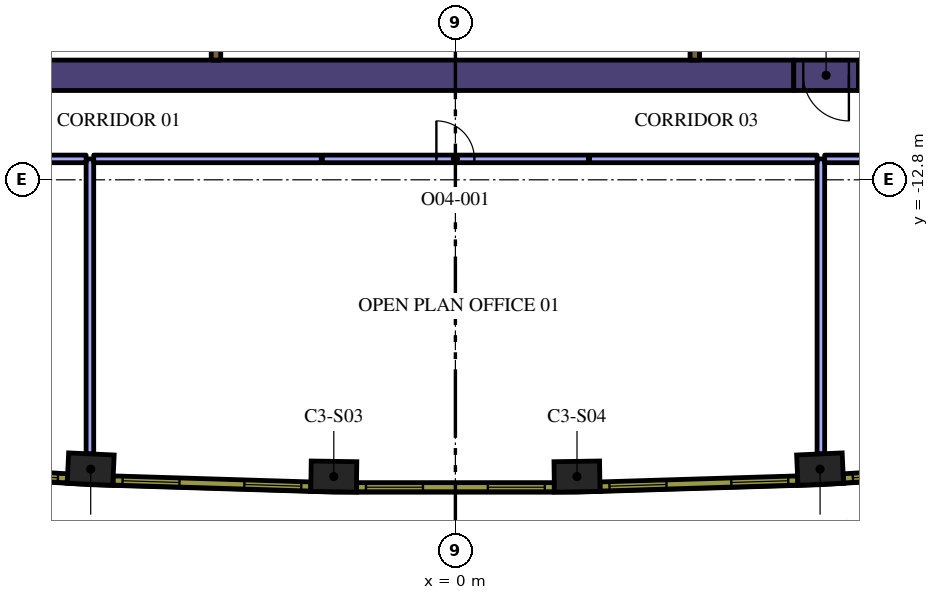
"""IFC4 building model, lengths in metres.
Left out: names, types, materials, properties, quantities, classifications, styles, units other than length and angle.
Written with IfcOpenShell. Run it as: python <this file> out.ifc"""

import sys

from ifc_helpers import new_model, si_unit, direction, frame, frame_2d, origin, origin_2d, place, context, subcontext, project, spatial, rectangle, extrude, element, fill, save


model = new_model("IFC4")
c1 = context("Model", 3, precision=1e-05, world=origin(), true_north=direction((0.0, 1.0)))
c2 = subcontext(c1, "Body", "Model", "MODEL_VIEW")
j1 = project(units=[si_unit("LENGTHUNIT", "METRE"), si_unit("PLANEANGLEUNIT", "RADIAN")], contexts=[c1])
p1 = place(None, origin())
s1 = spatial("IfcSite", under=j1, at=p1, CompositionType="ELEMENT")
p2 = place(p1, origin())
s2 = spatial("IfcBuilding", under=s1, at=p2, CompositionType="ELEMENT")
p3 = place(p2, frame((0.0, 0.0, 179.4)))
s3 = spatial("IfcBuildingStorey", under=s2, at=p3, CompositionType="ELEMENT", Elevation=179.4)
for number, where, z_axis, x_axis in (
    (1, (-9.597, -20.413, 0.0), (0.0, 0.0, 1.0), (0.999, -0.046, 0.0)),
    (2, (-3.2, -20.608, 0.0), (0.0, 0.0, 1.0), (1.0, -0.015, 0.0)),
    (3, (3.2, -20.608, 0.0), (0.0, 0.0, 1.0), (1.0, 0.015, 0.0)),
    (4, (9.597, -20.413, 0.0), (0.0, 0.0, 1.0), (0.999, 0.046, 0.0)),
):
    element("IfcColumn", number, at=place(p3, frame(where, z_axis=z_axis, x_axis=x_axis)), inside=s3, PredefinedType="COLUMN", context=c2, shape_type="SweptSolid", body=[
        extrude(rectangle(XDim=1.2, YDim=0.8, at=origin_2d()), origin(), (0.0, 0.0, 1.0), 4.2),
    ])
p4 = place(p3, frame((10.604, -10.05, 0.0), z_axis=(0.0, 0.0, 1.0), x_axis=(1.0, 0.0, 0.0)))
e5 = element("IfcWall", 5, at=p4, inside=s3, PredefinedType="SOLIDWALL", context=c2, shape_type="SweptSolid", body=[
    extrude(rectangle(XDim=1.849, YDim=0.8, at=frame_2d((0.925, 0.0))), origin(), (0.0, 0.0, 1.0), 4.2),
])
p5 = place(p3, frame((-13.378, -10.05, 0.0), z_axis=(0.0, 0.0, 1.0), x_axis=(1.0, 0.0, 0.0)))
e6 = element("IfcWall", 6, at=p5, inside=s3, PredefinedType="SOLIDWALL", context=c2, shape_type="SweptSolid", body=[
    extrude(rectangle(XDim=22.282, YDim=0.8, at=frame_2d((11.141, 0.0))), origin(), (0.0, 0.0, 1.0), 4.2),
])
p6 = place(p3, frame((-6.3, -8.925, 0.0), z_axis=(0.0, 0.0, 1.0), x_axis=(0.0, -1.0, 0.0)))
e7 = element("IfcWall", 7, at=p6, inside=s3, PredefinedType="SOLIDWALL", context=c2, shape_type="SweptSolid", body=[
    extrude(rectangle(XDim=0.725, YDim=0.25, at=frame_2d((0.363, 0.0))), origin(), (0.0, 0.0, 1.0), 4.2),
])
p7 = place(p3, frame((6.3, -9.65, 0.0), z_axis=(0.0, 0.0, 1.0), x_axis=(0.0, 1.0, 0.0)))
e8 = element("IfcWall", 8, at=p7, inside=s3, PredefinedType="SOLIDWALL", context=c2, shape_type="SweptSolid", body=[
    extrude(rectangle(XDim=1.008, YDim=0.25, at=frame_2d((0.504, 0.0))), origin(), (0.0, 0.0, 1.0), 4.2),
])
p8 = place(p3, frame((10.604, -10.05, 0.0), z_axis=(0.0, 0.0, 1.0), x_axis=(-1.0, 0.0, 0.0)))
e9 = element("IfcWall", 9, at=p8, inside=s3, PredefinedType="SOLIDWALL", context=c2, shape_type="SweptSolid", body=[
    extrude(rectangle(XDim=1.7, YDim=0.8, at=frame_2d((0.85, 0.0))), origin(), (0.0, 0.0, 1.0), 4.2),
])
p9 = place(p8, frame((0.25, 0.0, 0.0)))
e10 = element("IfcOpeningElement", 10, at=p9, cuts=e9, PredefinedType="OPENING", context=c2, shape_type="SweptSolid", body=[
    extrude(rectangle(XDim=1.2, YDim=2.1, at=frame_2d((0.6, 1.05))), frame((0.0, 0.41, 0.0), z_axis=(0.0, -1.0, 0.0), x_axis=(1.0, 0.0, 0.0)), (0.0, 0.0, 1.0), 0.82),
])
for number, where, z_axis, x_axis in (
    (11, (9.617, -12.25, 0.0), (0.0, 0.0, 1.0), (0.0, -1.0, 0.0)),
    (12, (-9.617, -20.011, 0.0), (0.0, 0.0, 1.0), (0.0, 1.0, 0.0)),
):
    element("IfcWall", number, at=place(p3, frame(where, z_axis=z_axis, x_axis=x_axis)), inside=s3, PredefinedType="PARTITIONING", context=c2, shape_type="SweptSolid", body=[
        extrude(rectangle(XDim=7.761, YDim=0.2, at=frame_2d((3.881, 0.0))), origin(), (0.0, 0.0, 1.0), 3.15),
    ])
p10 = place(p3, frame((-3.5, -12.25, 0.0), z_axis=(0.0, 0.0, 1.0), x_axis=(1.0, 0.0, 0.0)))
e13 = element("IfcWall", 13, at=p10, inside=s3, PredefinedType="PARTITIONING", context=c2, shape_type="SweptSolid", body=[
    extrude(rectangle(XDim=7.0, YDim=0.2, at=frame_2d((3.5, 0.0))), origin(), (0.0, 0.0, 1.0), 3.15),
])
p11 = place(p10, frame((3.0, 0.0, 0.0)))
e14 = element("IfcOpeningElement", 14, at=p11, cuts=e13, PredefinedType="OPENING", context=c2, shape_type="SweptSolid", body=[
    extrude(rectangle(XDim=1.0, YDim=2.1, at=frame_2d((0.5, 1.05))), frame((0.0, 0.11, 0.0), z_axis=(0.0, -1.0, 0.0), x_axis=(1.0, 0.0, 0.0)), (0.0, 0.0, 1.0), 0.22),
])
for number, where, z_axis, x_axis in (
    (15, (-9.517, -12.25, 0.0), (0.0, 0.0, 1.0), (1.0, 0.0, 0.0)),
    (16, (3.53, -12.25, 0.0), (0.0, 0.0, 1.0), (1.0, 0.0, 0.0)),
):
    element("IfcWall", number, at=place(p3, frame(where, z_axis=z_axis, x_axis=x_axis)), inside=s3, PredefinedType="PARTITIONING", context=c2, shape_type="SweptSolid", body=[
        extrude(rectangle(XDim=5.987, YDim=0.2, at=frame_2d((2.994, 0.0))), origin(), (0.0, 0.0, 1.0), 3.15),
    ])
p12 = place(p3, frame((9.717, -12.25, 0.0), z_axis=(0.0, 0.0, 1.0), x_axis=(1.0, 0.0, 0.0)))
e17 = element("IfcWall", 17, at=p12, inside=s3, PredefinedType="PARTITIONING", context=c2, shape_type="SweptSolid", body=[
    extrude(rectangle(XDim=4.688, YDim=0.2, at=frame_2d((2.344, 0.0))), origin(), (0.0, 0.0, 1.0), 3.15),
])
p13 = place(p12, frame((1.8, 0.0, 0.0)))
e18 = element("IfcOpeningElement", 18, at=p13, cuts=e17, PredefinedType="OPENING", context=c2, shape_type="SweptSolid", body=[
    extrude(rectangle(XDim=1.0, YDim=2.1, at=frame_2d((0.5, 1.05))), frame((0.0, 0.11, 0.0), z_axis=(0.0, -1.0, 0.0), x_axis=(1.0, 0.0, 0.0)), (0.0, 0.0, 1.0), 0.22),
])
p14 = place(p3, frame((-14.375, -12.25, 0.0), z_axis=(0.0, 0.0, 1.0), x_axis=(1.0, 0.0, 0.0)))
e19 = element("IfcWall", 19, at=p14, inside=s3, PredefinedType="PARTITIONING", context=c2, shape_type="SweptSolid", body=[
    extrude(rectangle(XDim=4.658, YDim=0.2, at=frame_2d((2.329, 0.0))), origin(), (0.0, 0.0, 1.0), 3.15),
])
p15 = place(p14, frame((1.8, 0.0, 0.0)))
e20 = element("IfcOpeningElement", 20, at=p15, cuts=e19, PredefinedType="OPENING", context=c2, shape_type="SweptSolid", body=[
    extrude(rectangle(XDim=1.0, YDim=2.1, at=frame_2d((0.5, 1.05))), frame((0.0, 0.11, 0.0), z_axis=(0.0, -1.0, 0.0), x_axis=(1.0, 0.0, 0.0)), (0.0, 0.0, 1.0), 0.22),
])
p16 = place(p3, frame((-15.405, -20.338, 0.0), z_axis=(0.0, 0.0, 1.0), x_axis=(0.998135294646, -0.061040425794, 0.0)))
e21 = element("IfcWall", 21, at=p16, inside=s3, PredefinedType="SOLIDWALL", context=c2, shape_type="SweptSolid", body=[
    extrude(rectangle(XDim=5.204, YDim=0.24, at=frame_2d((2.602, 0.0))), origin(), (0.0, 0.0, 1.0), 3.95),
])
p17 = place(p16, frame((0.248, 0.0, 0.9)))
e22 = element("IfcOpeningElement", 22, at=p17, cuts=e21, PredefinedType="OPENING", context=c2, shape_type="SweptSolid", body=[
    extrude(rectangle(XDim=1.5, YDim=2.55, at=frame_2d((0.75, 1.275))), frame((0.0, 0.13, 0.0), z_axis=(0.0, -1.0, 0.0), x_axis=(1.0, 0.0, 0.0)), (0.0, 0.0, 1.0), 0.26),
])
p18 = place(p16, frame((3.455, 0.0, 0.9)))
e23 = element("IfcOpeningElement", 23, at=p18, cuts=e21, PredefinedType="OPENING", context=c2, shape_type="SweptSolid", body=[
    extrude(rectangle(XDim=1.5, YDim=2.55, at=frame_2d((0.75, 1.275))), frame((0.0, 0.13, 0.0), z_axis=(0.0, -1.0, 0.0), x_axis=(1.0, 0.0, 0.0)), (0.0, 0.0, 1.0), 0.26),
])
p19 = place(p3, frame((-9.007, -20.711, 0.0), z_axis=(0.0, 0.0, 1.0), x_axis=(0.999533441983, -0.030543384845, 0.0)))
e24 = element("IfcWall", 24, at=p19, inside=s3, PredefinedType="SOLIDWALL", context=c2, shape_type="SweptSolid", body=[
    extrude(rectangle(XDim=5.204, YDim=0.24, at=frame_2d((2.602, 0.0))), origin(), (0.0, 0.0, 1.0), 3.95),
])
p20 = place(p19, frame((0.248, 0.0, 0.9)))
e25 = element("IfcOpeningElement", 25, at=p20, cuts=e24, PredefinedType="OPENING", context=c2, shape_type="SweptSolid", body=[
    extrude(rectangle(XDim=1.5, YDim=2.55, at=frame_2d((0.75, 1.275))), frame((0.0, 0.13, 0.0), z_axis=(0.0, -1.0, 0.0), x_axis=(1.0, 0.0, 0.0)), (0.0, 0.0, 1.0), 0.26),
])
p21 = place(p19, frame((3.455, 0.0, 0.9)))
e26 = element("IfcOpeningElement", 26, at=p21, cuts=e24, PredefinedType="OPENING", context=c2, shape_type="SweptSolid", body=[
    extrude(rectangle(XDim=1.5, YDim=2.55, at=frame_2d((0.75, 1.275))), frame((0.0, 0.13, 0.0), z_axis=(0.0, -1.0, 0.0), x_axis=(1.0, 0.0, 0.0)), (0.0, 0.0, 1.0), 0.26),
])
p22 = place(p3, frame((-2.602, -20.888, 0.0), z_axis=(0.0, 0.0, 1.0), x_axis=(1.0, 0.0, 0.0)))
e27 = element("IfcWall", 27, at=p22, inside=s3, PredefinedType="SOLIDWALL", context=c2, shape_type="SweptSolid", body=[
    extrude(rectangle(XDim=5.204, YDim=0.24, at=frame_2d((2.602, 0.0))), origin(), (0.0, 0.0, 1.0), 3.95),
])
p23 = place(p22, frame((0.248, 0.0, 0.9)))
e28 = element("IfcOpeningElement", 28, at=p23, cuts=e27, PredefinedType="OPENING", context=c2, shape_type="SweptSolid", body=[
    extrude(rectangle(XDim=1.5, YDim=2.55, at=frame_2d((0.75, 1.275))), frame((0.0, 0.13, 0.0), z_axis=(0.0, -1.0, 0.0), x_axis=(1.0, 0.0, 0.0)), (0.0, 0.0, 1.0), 0.26),
])
p24 = place(p22, frame((3.455, 0.0, 0.9)))
e29 = element("IfcOpeningElement", 29, at=p24, cuts=e27, PredefinedType="OPENING", context=c2, shape_type="SweptSolid", body=[
    extrude(rectangle(XDim=1.5, YDim=2.55, at=frame_2d((0.75, 1.275))), frame((0.0, 0.13, 0.0), z_axis=(0.0, -1.0, 0.0), x_axis=(1.0, 0.0, 0.0)), (0.0, 0.0, 1.0), 0.26),
])
p25 = place(p3, frame((3.806, -20.87, 0.0), z_axis=(0.0, 0.0, 1.0), x_axis=(0.999533441983, 0.030543384845, 0.0)))
e30 = element("IfcWall", 30, at=p25, inside=s3, PredefinedType="SOLIDWALL", context=c2, shape_type="SweptSolid", body=[
    extrude(rectangle(XDim=5.204, YDim=0.24, at=frame_2d((2.602, 0.0))), origin(), (0.0, 0.0, 1.0), 3.95),
])
p26 = place(p25, frame((0.248, 0.0, 0.9)))
e31 = element("IfcOpeningElement", 31, at=p26, cuts=e30, PredefinedType="OPENING", context=c2, shape_type="SweptSolid", body=[
    extrude(rectangle(XDim=1.5, YDim=2.55, at=frame_2d((0.75, 1.275))), frame((0.0, 0.13, 0.0), z_axis=(0.0, -1.0, 0.0), x_axis=(1.0, 0.0, 0.0)), (0.0, 0.0, 1.0), 0.26),
])
p27 = place(p25, frame((3.455, 0.0, 0.9)))
e32 = element("IfcOpeningElement", 32, at=p27, cuts=e30, PredefinedType="OPENING", context=c2, shape_type="SweptSolid", body=[
    extrude(rectangle(XDim=1.5, YDim=2.55, at=frame_2d((0.75, 1.275))), frame((0.0, 0.13, 0.0), z_axis=(0.0, -1.0, 0.0), x_axis=(1.0, 0.0, 0.0)), (0.0, 0.0, 1.0), 0.26),
])
p28 = place(p3, frame((10.211, -20.656, 0.0), z_axis=(0.0, 0.0, 1.0), x_axis=(0.998135294646, 0.061040425794, 0.0)))
e33 = element("IfcWall", 33, at=p28, inside=s3, PredefinedType="SOLIDWALL", context=c2, shape_type="SweptSolid", body=[
    extrude(rectangle(XDim=5.204, YDim=0.24, at=frame_2d((2.602, 0.0))), origin(), (0.0, 0.0, 1.0), 3.95),
])
p29 = place(p28, frame((0.248, 0.0, 0.9)))
e34 = element("IfcOpeningElement", 34, at=p29, cuts=e33, PredefinedType="OPENING", context=c2, shape_type="SweptSolid", body=[
    extrude(rectangle(XDim=1.5, YDim=2.55, at=frame_2d((0.75, 1.275))), frame((0.0, 0.13, 0.0), z_axis=(0.0, -1.0, 0.0), x_axis=(1.0, 0.0, 0.0)), (0.0, 0.0, 1.0), 0.26),
])
p30 = place(p28, frame((3.455, 0.0, 0.9)))
e35 = element("IfcOpeningElement", 35, at=p30, cuts=e33, PredefinedType="OPENING", context=c2, shape_type="SweptSolid", body=[
    extrude(rectangle(XDim=1.5, YDim=2.55, at=frame_2d((0.75, 1.275))), frame((0.0, 0.13, 0.0), z_axis=(0.0, -1.0, 0.0), x_axis=(1.0, 0.0, 0.0)), (0.0, 0.0, 1.0), 0.26),
])
p31 = place(p9, origin())
e36 = element("IfcDoor", 36, at=p31, inside=s3, OperationType="SINGLE_SWING_LEFT", PredefinedType="DOOR", context=c2, shape_type="SweptSolid", body=[
    extrude(rectangle(XDim=1.2, YDim=2.1, at=frame_2d((0.6, 1.05))), frame((0.0, 0.025, 0.0), z_axis=(0.0, -1.0, 0.0), x_axis=(1.0, 0.0, 0.0)), (0.0, 0.0, 1.0), 0.05),
])
fill(e10, e36)
p32 = place(p11, origin())
e37 = element("IfcDoor", 37, at=p32, inside=s3, OperationType="SINGLE_SWING_RIGHT", PredefinedType="DOOR", context=c2, shape_type="SweptSolid", body=[
    extrude(rectangle(XDim=1.0, YDim=2.1, at=frame_2d((0.5, 1.05))), frame((0.0, 0.025, 0.0), z_axis=(0.0, -1.0, 0.0), x_axis=(1.0, 0.0, 0.0)), (0.0, 0.0, 1.0), 0.05),
])
fill(e14, e37)
p33 = place(p18, origin())
e38 = element("IfcWindow", 38, at=p33, inside=s3, PartitioningType="SINGLE_PANEL", PredefinedType="WINDOW", context=c2, shape_type="SweptSolid", body=[
    extrude(rectangle(XDim=1.5, YDim=2.55, at=frame_2d((0.75, 1.275))), frame((0.0, 0.04, 0.0), z_axis=(0.0, -1.0, 0.0), x_axis=(1.0, 0.0, 0.0)), (0.0, 0.0, 1.0), 0.06),
])
fill(e23, e38)
p34 = place(p20, origin())
e39 = element("IfcWindow", 39, at=p34, inside=s3, PartitioningType="SINGLE_PANEL", PredefinedType="WINDOW", context=c2, shape_type="SweptSolid", body=[
    extrude(rectangle(XDim=1.5, YDim=2.55, at=frame_2d((0.75, 1.275))), frame((0.0, 0.04, 0.0), z_axis=(0.0, -1.0, 0.0), x_axis=(1.0, 0.0, 0.0)), (0.0, 0.0, 1.0), 0.06),
])
fill(e25, e39)
p35 = place(p21, origin())
e40 = element("IfcWindow", 40, at=p35, inside=s3, PartitioningType="SINGLE_PANEL", PredefinedType="WINDOW", context=c2, shape_type="SweptSolid", body=[
    extrude(rectangle(XDim=1.5, YDim=2.55, at=frame_2d((0.75, 1.275))), frame((0.0, 0.04, 0.0), z_axis=(0.0, -1.0, 0.0), x_axis=(1.0, 0.0, 0.0)), (0.0, 0.0, 1.0), 0.06),
])
fill(e26, e40)
p36 = place(p23, origin())
e41 = element("IfcWindow", 41, at=p36, inside=s3, PartitioningType="SINGLE_PANEL", PredefinedType="WINDOW", context=c2, shape_type="SweptSolid", body=[
    extrude(rectangle(XDim=1.5, YDim=2.55, at=frame_2d((0.75, 1.275))), frame((0.0, 0.04, 0.0), z_axis=(0.0, -1.0, 0.0), x_axis=(1.0, 0.0, 0.0)), (0.0, 0.0, 1.0), 0.06),
])
fill(e28, e41)
p37 = place(p24, origin())
e42 = element("IfcWindow", 42, at=p37, inside=s3, PartitioningType="SINGLE_PANEL", PredefinedType="WINDOW", context=c2, shape_type="SweptSolid", body=[
    extrude(rectangle(XDim=1.5, YDim=2.55, at=frame_2d((0.75, 1.275))), frame((0.0, 0.04, 0.0), z_axis=(0.0, -1.0, 0.0), x_axis=(1.0, 0.0, 0.0)), (0.0, 0.0, 1.0), 0.06),
])
fill(e29, e42)
p38 = place(p26, origin())
e43 = element("IfcWindow", 43, at=p38, inside=s3, PartitioningType="SINGLE_PANEL", PredefinedType="WINDOW", context=c2, shape_type="SweptSolid", body=[
    extrude(rectangle(XDim=1.5, YDim=2.55, at=frame_2d((0.75, 1.275))), frame((0.0, 0.04, 0.0), z_axis=(0.0, -1.0, 0.0), x_axis=(1.0, 0.0, 0.0)), (0.0, 0.0, 1.0), 0.06),
])
fill(e31, e43)
p39 = place(p27, origin())
e44 = element("IfcWindow", 44, at=p39, inside=s3, PartitioningType="SINGLE_PANEL", PredefinedType="WINDOW", context=c2, shape_type="SweptSolid", body=[
    extrude(rectangle(XDim=1.5, YDim=2.55, at=frame_2d((0.75, 1.275))), frame((0.0, 0.04, 0.0), z_axis=(0.0, -1.0, 0.0), x_axis=(1.0, 0.0, 0.0)), (0.0, 0.0, 1.0), 0.06),
])
fill(e32, e44)
p40 = place(p29, origin())
e45 = element("IfcWindow", 45, at=p40, inside=s3, PartitioningType="SINGLE_PANEL", PredefinedType="WINDOW", context=c2, shape_type="SweptSolid", body=[
    extrude(rectangle(XDim=1.5, YDim=2.55, at=frame_2d((0.75, 1.275))), frame((0.0, 0.04, 0.0), z_axis=(0.0, -1.0, 0.0), x_axis=(1.0, 0.0, 0.0)), (0.0, 0.0, 1.0), 0.06),
])
fill(e34, e45)
save(model, sys.argv[1])
